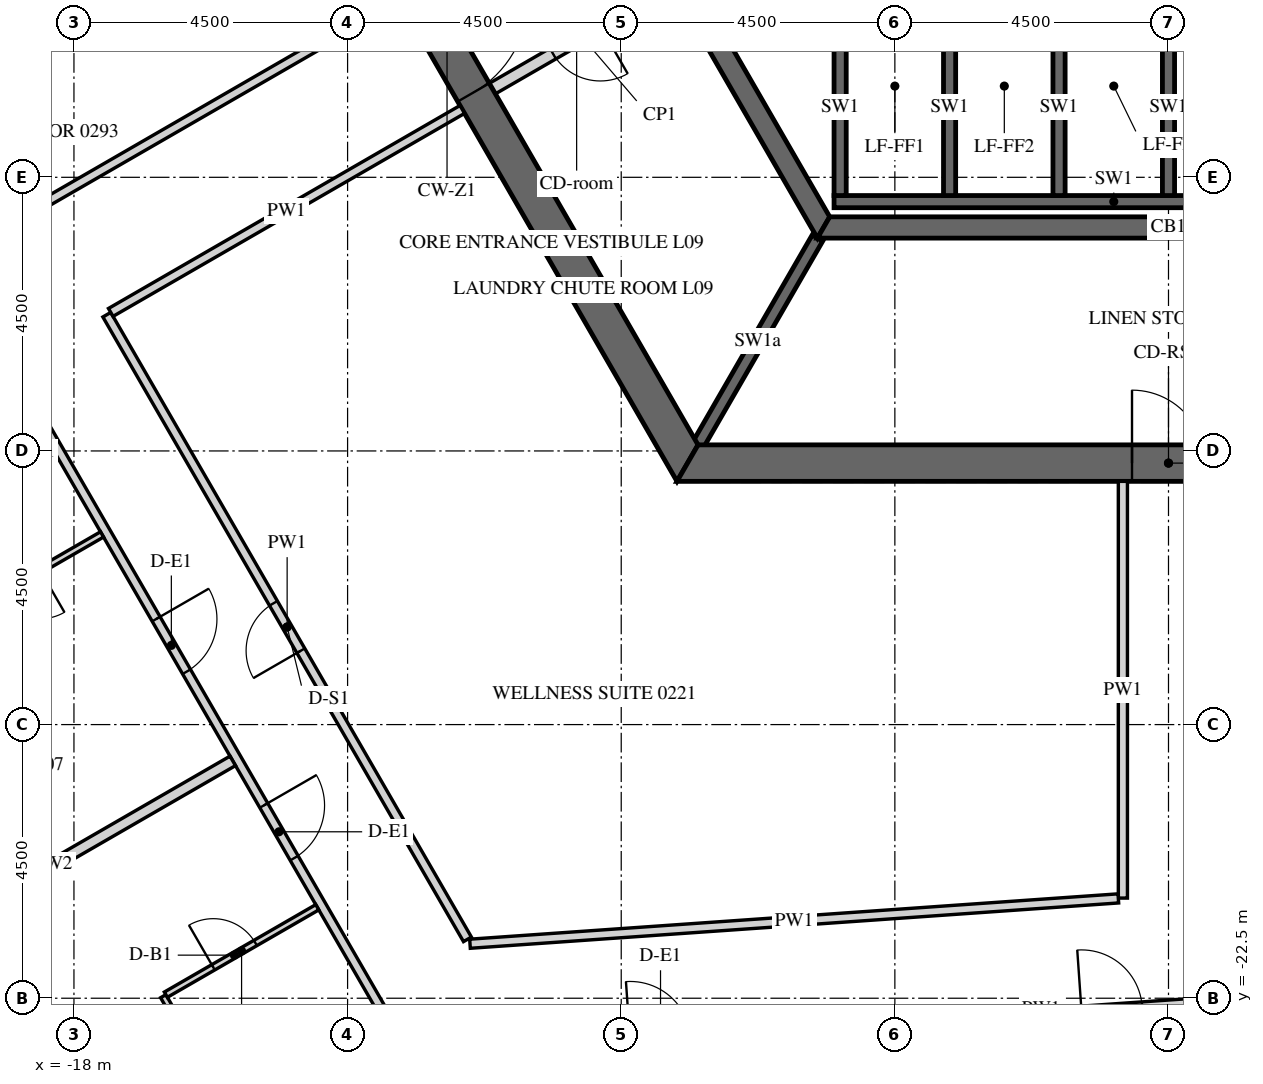
"""IFC4 building model, lengths in metres.
Left out: names, types, materials, properties, quantities, classifications, styles, units other than length and angle.
Written with IfcOpenShell. Run it as: python <this file> out.ifc"""

import sys

from ifc_helpers import new_model, si_unit, direction, frame, frame_2d, origin, place, context, subcontext, project, spatial, polyline, rectangle, outline, extrude, element, fill, save


model = new_model("IFC4")
c1 = context("Model", 3, precision=1e-05, world=origin(), true_north=direction((0.0, 1.0)))
c2 = subcontext(c1, "Body", "Model", "MODEL_VIEW")
j1 = project(units=[si_unit("LENGTHUNIT", "METRE"), si_unit("PLANEANGLEUNIT", "RADIAN")], contexts=[c1])
p1 = place(None, origin())
s1 = spatial("IfcSite", under=j1, at=p1, CompositionType="ELEMENT")
p2 = place(p1, origin())
s2 = spatial("IfcBuilding", under=s1, at=p2, CompositionType="ELEMENT")
p3 = place(p2, frame((0.0, 0.0, 49.2)))
s3 = spatial("IfcBuildingStorey", under=s2, at=p3, CompositionType="ELEMENT", Elevation=49.2)
p4 = place(p3, frame((-32.655, -2.89, -0.15), z_axis=(0.0, 0.0, 1.0), x_axis=(0.499997711317, -0.866026725152, 0.0)))
e1 = element("IfcWall", 1, at=p4, inside=s3, PredefinedType="SOLIDWALL", context=c2, shape_type="SweptSolid", body=[
    extrude(outline(polyline([(-0.022, -0.275), (30.097, -0.275), (30.045, 0.275), (0.022, 0.275), (-0.022, -0.275)])), origin(), (0.0, 0.0, 1.0), 3.9),
])
p5 = place(p4, frame((1.236, 0.0, 1.05)))
e2 = element("IfcOpeningElement", 2, at=p5, cuts=e1, PredefinedType="OPENING", context=c2, shape_type="SweptSolid", body=[
    extrude(rectangle(XDim=2.4, YDim=2.4, at=frame_2d((1.2, 1.2))), frame((0.0, 0.285, 0.0), z_axis=(0.0, -1.0, 0.0), x_axis=(1.0, 0.0, 0.0)), (0.0, 0.0, 1.0), 0.57),
])
p6 = place(p4, frame((4.835, 0.0, 1.05)))
e3 = element("IfcOpeningElement", 3, at=p6, cuts=e1, PredefinedType="OPENING", context=c2, shape_type="SweptSolid", body=[
    extrude(rectangle(XDim=2.4, YDim=2.4, at=frame_2d((1.2, 1.2))), frame((0.0, 0.285, 0.0), z_axis=(0.0, -1.0, 0.0), x_axis=(1.0, 0.0, 0.0)), (0.0, 0.0, 1.0), 0.57),
])
p7 = place(p4, frame((8.436, 0.0, 1.05)))
e4 = element("IfcOpeningElement", 4, at=p7, cuts=e1, PredefinedType="OPENING", context=c2, shape_type="SweptSolid", body=[
    extrude(rectangle(XDim=2.4, YDim=2.4, at=frame_2d((1.2, 1.2))), frame((0.0, 0.285, 0.0), z_axis=(0.0, -1.0, 0.0), x_axis=(1.0, 0.0, 0.0)), (0.0, 0.0, 1.0), 0.57),
])
p8 = place(p4, frame((12.035, 0.0, 1.05)))
e5 = element("IfcOpeningElement", 5, at=p8, cuts=e1, PredefinedType="OPENING", context=c2, shape_type="SweptSolid", body=[
    extrude(rectangle(XDim=2.4, YDim=2.4, at=frame_2d((1.2, 1.2))), frame((0.0, 0.285, 0.0), z_axis=(0.0, -1.0, 0.0), x_axis=(1.0, 0.0, 0.0)), (0.0, 0.0, 1.0), 0.57),
])
p9 = place(p4, frame((15.635, 0.0, 1.05)))
e6 = element("IfcOpeningElement", 6, at=p9, cuts=e1, PredefinedType="OPENING", context=c2, shape_type="SweptSolid", body=[
    extrude(rectangle(XDim=2.4, YDim=2.4, at=frame_2d((1.2, 1.2))), frame((0.0, 0.285, 0.0), z_axis=(0.0, -1.0, 0.0), x_axis=(1.0, 0.0, 0.0)), (0.0, 0.0, 1.0), 0.57),
])
p10 = place(p4, frame((19.236, 0.0, 1.05)))
e7 = element("IfcOpeningElement", 7, at=p10, cuts=e1, PredefinedType="OPENING", context=c2, shape_type="SweptSolid", body=[
    extrude(rectangle(XDim=2.4, YDim=2.4, at=frame_2d((1.2, 1.2))), frame((0.0, 0.285, 0.0), z_axis=(0.0, -1.0, 0.0), x_axis=(1.0, 0.0, 0.0)), (0.0, 0.0, 1.0), 0.57),
])
p11 = place(p4, frame((22.835, 0.0, 1.05)))
e8 = element("IfcOpeningElement", 8, at=p11, cuts=e1, PredefinedType="OPENING", context=c2, shape_type="SweptSolid", body=[
    extrude(rectangle(XDim=2.4, YDim=2.4, at=frame_2d((1.2, 1.2))), frame((0.0, 0.285, 0.0), z_axis=(0.0, -1.0, 0.0), x_axis=(1.0, 0.0, 0.0)), (0.0, 0.0, 1.0), 0.57),
])
p12 = place(p4, frame((26.436, 0.0, 1.05)))
e9 = element("IfcOpeningElement", 9, at=p12, cuts=e1, PredefinedType="OPENING", context=c2, shape_type="SweptSolid", body=[
    extrude(rectangle(XDim=2.4, YDim=2.4, at=frame_2d((1.2, 1.2))), frame((0.0, 0.285, 0.0), z_axis=(0.0, -1.0, 0.0), x_axis=(1.0, 0.0, 0.0)), (0.0, 0.0, 1.0), 0.57),
])
p13 = place(p3, frame((-15.819, 0.0, -0.15), z_axis=(0.0, 0.0, 1.0), x_axis=(0.499999880136, -0.866025472988, 0.0)))
e10 = element("IfcWall", 10, at=p13, inside=s3, PredefinedType="SHEAR", context=c2, shape_type="SweptSolid", body=[
    extrude(outline(polyline([(-0.173, -0.3), (15.993, -0.3), (15.646, 0.3), (0.173, 0.3), (-0.173, -0.3)])), origin(), (0.0, 0.0, 1.0), 3.9),
])
p14 = place(p13, frame((6.981, 0.0, 0.15)))
e11 = element("IfcOpeningElement", 11, at=p14, cuts=e10, PredefinedType="OPENING", context=c2, shape_type="SweptSolid", body=[
    extrude(rectangle(XDim=1.8, YDim=2.4, at=frame_2d((0.9, 1.2))), frame((0.0, 0.31, 0.0), z_axis=(0.0, -1.0, 0.0), x_axis=(1.0, 0.0, 0.0)), (0.0, 0.0, 1.0), 0.62),
])
p15 = place(p3, frame((-7.91, -13.7, -0.15), z_axis=(0.0, 0.0, 1.0), x_axis=(1.0, 0.0, 0.0)))
e12 = element("IfcWall", 12, at=p15, inside=s3, PredefinedType="SHEAR", context=c2, shape_type="SweptSolid", body=[
    extrude(outline(polyline([(-0.173, -0.3), (15.993, -0.3), (15.646, 0.3), (0.173, 0.3), (-0.173, -0.3)])), origin(), (0.0, 0.0, 1.0), 3.9),
])
p16 = place(p15, frame((7.31, 0.0, 0.15)))
e13 = element("IfcOpeningElement", 13, at=p16, cuts=e12, PredefinedType="OPENING", context=c2, shape_type="SweptSolid", body=[
    extrude(rectangle(XDim=1.2, YDim=2.4, at=frame_2d((0.6, 1.2))), frame((0.0, 0.31, 0.0), z_axis=(0.0, -1.0, 0.0), x_axis=(1.0, 0.0, 0.0)), (0.0, 0.0, 1.0), 0.62),
])
p17 = place(p3, frame((-11.345, 0.0, -0.15), z_axis=(0.0, 0.0, 1.0), x_axis=(0.499995046907, -0.866028263435, 0.0)))
e14 = element("IfcWall", 14, at=p17, inside=s3, PredefinedType="SHEAR", context=c2, shape_type="SweptSolid", body=[
    extrude(outline(polyline([(-0.101, -0.175), (11.446, -0.175), (11.244, 0.175), (0.101, 0.175), (-0.101, -0.175)])), origin(), (0.0, 0.0, 1.0), 3.9),
])
p18 = place(p17, frame((4.744, 0.0, 0.15)))
e15 = element("IfcOpeningElement", 15, at=p18, cuts=e14, PredefinedType="OPENING", context=c2, shape_type="SweptSolid", body=[
    extrude(rectangle(XDim=1.8, YDim=2.4, at=frame_2d((0.9, 1.2))), frame((0.0, 0.185, 0.0), z_axis=(0.0, -1.0, 0.0), x_axis=(1.0, 0.0, 0.0)), (0.0, 0.0, 1.0), 0.37),
])
p19 = place(p3, frame((-5.673, -9.825, -0.15), z_axis=(0.0, 0.0, 1.0), x_axis=(1.0, 0.0, 0.0)))
e16 = element("IfcWall", 16, at=p19, inside=s3, PredefinedType="SHEAR", context=c2, shape_type="SweptSolid", body=[
    extrude(outline(polyline([(-0.101, -0.175), (11.446, -0.175), (11.244, 0.175), (0.101, 0.175), (-0.101, -0.175)])), origin(), (0.0, 0.0, 1.0), 3.9),
])
p20 = place(p3, frame((-5.5, -9.4, -0.25), z_axis=(0.0, 0.0, 1.0), x_axis=(1.0, 0.0, 0.0)))
e17 = element("IfcWall", 17, at=p20, inside=s3, PredefinedType="SHEAR", context=c2, shape_type="SweptSolid", body=[
    extrude(rectangle(XDim=9.2, YDim=0.2, at=frame_2d((4.6, 0.0))), origin(), (0.0, 0.0, 1.0), 3.9),
])
for number, where, z_axis, x_axis in (
    (18, (-5.4, -9.3, -0.25), (0.0, 0.0, 1.0), (0.0, 1.0, 0.0)),
    (19, (-3.6, -9.3, -0.25), (0.0, 0.0, 1.0), (0.0, 1.0, 0.0)),
    (20, (-1.8, -9.3, -0.25), (0.0, 0.0, 1.0), (0.0, 1.0, 0.0)),
    (21, (0.0, -9.3, -0.25), (0.0, 0.0, 1.0), (0.0, 1.0, 0.0)),
):
    element("IfcWall", number, at=place(p3, frame(where, z_axis=z_axis, x_axis=x_axis)), inside=s3, PredefinedType="SHEAR", context=c2, shape_type="SweptSolid", body=[
        extrude(rectangle(XDim=2.9, YDim=0.2, at=frame_2d((1.45, 0.0))), origin(), (0.0, 0.0, 1.0), 3.9),
    ])
p21 = place(p3, frame((-5.773, -10.0, -0.15), z_axis=(0.0, 0.0, 1.0), x_axis=(-0.500038251005, -0.86600331843, 0.0)))
e22 = element("IfcWall", 22, at=p21, inside=s3, PredefinedType="SHEAR", context=c2, shape_type="SweptSolid", body=[
    extrude(rectangle(XDim=3.926, YDim=0.2, at=frame_2d((1.963, 0.0))), origin(), (0.0, 0.0, 1.0), 3.9),
])
p22 = place(p3, frame((-8.175, -5.841, 0.0), z_axis=(0.0, 0.0, 1.0), x_axis=(-0.866020560687, -0.500008388397, 0.0)))
e23 = element("IfcWall", 23, at=p22, inside=s3, PredefinedType="PARTITIONING", context=c2, shape_type="SweptSolid", body=[
    extrude(rectangle(XDim=3.4, YDim=0.2, at=frame_2d((1.7, 0.0))), origin(), (0.0, 0.0, 1.0), 3.65),
])
p23 = place(p22, frame((1.35, 0.0, 0.0)))
e24 = element("IfcOpeningElement", 24, at=p23, cuts=e23, PredefinedType="OPENING", context=c2, shape_type="SweptSolid", body=[
    extrude(rectangle(XDim=0.9, YDim=2.1, at=frame_2d((0.45, 1.05))), frame((0.0, 0.11, 0.0), z_axis=(0.0, -1.0, 0.0), x_axis=(1.0, 0.0, 0.0)), (0.0, 0.0, 1.0), 0.22),
])
p24 = place(p3, frame((-24.783, -2.175, 0.0), z_axis=(0.0, 0.0, 1.0), x_axis=(0.500001098408, -0.866024769617, 0.0)))
e25 = element("IfcWall", 25, at=p24, inside=s3, PredefinedType="PARTITIONING", context=c2, shape_type="SweptSolid", body=[
    extrude(rectangle(XDim=24.599, YDim=0.15, at=frame_2d((12.299, 0.0))), origin(), (0.0, 0.0, 1.0), 2.988),
])
p25 = place(p24, frame((2.816, 0.0, 0.0)))
e26 = element("IfcOpeningElement", 26, at=p25, cuts=e25, PredefinedType="OPENING", context=c2, shape_type="SweptSolid", body=[
    extrude(rectangle(XDim=1.0, YDim=2.1, at=frame_2d((0.5, 1.05))), frame((0.0, 0.085, 0.0), z_axis=(0.0, -1.0, 0.0), x_axis=(1.0, 0.0, 0.0)), (0.0, 0.0, 1.0), 0.17),
])
p26 = place(p24, frame((8.919, 0.0, 0.0)))
e27 = element("IfcOpeningElement", 27, at=p26, cuts=e25, PredefinedType="OPENING", context=c2, shape_type="SweptSolid", body=[
    extrude(rectangle(XDim=1.0, YDim=2.1, at=frame_2d((0.5, 1.05))), frame((0.0, 0.085, 0.0), z_axis=(0.0, -1.0, 0.0), x_axis=(1.0, 0.0, 0.0)), (0.0, 0.0, 1.0), 0.17),
])
p27 = place(p24, frame((16.269, 0.0, 0.0)))
e28 = element("IfcOpeningElement", 28, at=p27, cuts=e25, PredefinedType="OPENING", context=c2, shape_type="SweptSolid", body=[
    extrude(rectangle(XDim=1.0, YDim=2.1, at=frame_2d((0.5, 1.05))), frame((0.0, 0.085, 0.0), z_axis=(0.0, -1.0, 0.0), x_axis=(1.0, 0.0, 0.0)), (0.0, 0.0, 1.0), 0.17),
])
p28 = place(p24, frame((19.809, 0.0, 0.0)))
e29 = element("IfcOpeningElement", 29, at=p28, cuts=e25, PredefinedType="OPENING", context=c2, shape_type="SweptSolid", body=[
    extrude(rectangle(XDim=1.0, YDim=2.1, at=frame_2d((0.5, 1.05))), frame((0.0, 0.085, 0.0), z_axis=(0.0, -1.0, 0.0), x_axis=(1.0, 0.0, 0.0)), (0.0, 0.0, 1.0), 0.17),
])
p29 = place(p3, frame((-12.4, -23.472, 0.0), z_axis=(0.0, 0.0, 1.0), x_axis=(0.997564133303, 0.069755286163, 0.0)))
e30 = element("IfcWall", 30, at=p29, inside=s3, PredefinedType="PARTITIONING", context=c2, shape_type="SweptSolid", body=[
    extrude(rectangle(XDim=22.669, YDim=0.15, at=frame_2d((11.334, 0.0))), origin(), (0.0, 0.0, 1.0), 2.988),
])
p30 = place(p29, frame((3.556, 0.0, 0.0)))
e31 = element("IfcOpeningElement", 31, at=p30, cuts=e30, PredefinedType="OPENING", context=c2, shape_type="SweptSolid", body=[
    extrude(rectangle(XDim=1.0, YDim=2.1, at=frame_2d((0.5, 1.05))), frame((0.0, 0.085, 0.0), z_axis=(0.0, -1.0, 0.0), x_axis=(1.0, 0.0, 0.0)), (0.0, 0.0, 1.0), 0.17),
])
p31 = place(p29, frame((10.996, 0.0, 0.0)))
e32 = element("IfcOpeningElement", 32, at=p31, cuts=e30, PredefinedType="OPENING", context=c2, shape_type="SweptSolid", body=[
    extrude(rectangle(XDim=1.0, YDim=2.1, at=frame_2d((0.5, 1.05))), frame((0.0, 0.085, 0.0), z_axis=(0.0, -1.0, 0.0), x_axis=(1.0, 0.0, 0.0)), (0.0, 0.0, 1.0), 0.17),
])
p32 = place(p3, frame((-12.664, -6.066, 0.0), z_axis=(0.0, 0.0, 1.0), x_axis=(-0.866026575979, -0.499997969693, 0.0)))
e33 = element("IfcWall", 33, at=p32, inside=s3, PredefinedType="PARTITIONING", context=c2, shape_type="SweptSolid", body=[
    extrude(rectangle(XDim=6.75, YDim=0.15, at=frame_2d((3.375, 0.0))), origin(), (0.0, 0.0, 1.0), 2.988),
])
p33 = place(p3, frame((-0.75, -14.0, 0.0), z_axis=(0.0, 0.0, 1.0), x_axis=(0.0, -1.0, 0.0)))
e34 = element("IfcWall", 34, at=p33, inside=s3, PredefinedType="PARTITIONING", context=c2, shape_type="SweptSolid", body=[
    extrude(rectangle(XDim=6.853, YDim=0.15, at=frame_2d((3.427, 0.0))), origin(), (0.0, 0.0, 1.0), 2.988),
])
p34 = place(p3, frame((-0.825, -20.858, 0.0), z_axis=(0.0, 0.0, 1.0), x_axis=(-0.997563801863, -0.069760025895, 0.0)))
e35 = element("IfcWall", 35, at=p34, inside=s3, PredefinedType="PARTITIONING", context=c2, shape_type="SweptSolid", body=[
    extrude(rectangle(XDim=10.688, YDim=0.15, at=frame_2d((5.344, 0.0))), origin(), (0.0, 0.0, 1.0), 2.988),
])
p35 = place(p3, frame((-11.529, -21.532, 0.0), z_axis=(0.0, 0.0, 1.0), x_axis=(-0.499990893337, 0.866030661455, 0.0)))
e36 = element("IfcWall", 36, at=p35, inside=s3, PredefinedType="PARTITIONING", context=c2, shape_type="SweptSolid", body=[
    extrude(rectangle(XDim=11.862, YDim=0.15, at=frame_2d((5.931, 0.0))), origin(), (0.0, 0.0, 1.0), 2.988),
])
p36 = place(p35, frame((5.481, 0.0, 0.0)))
e37 = element("IfcOpeningElement", 37, at=p36, cuts=e36, PredefinedType="OPENING", context=c2, shape_type="SweptSolid", body=[
    extrude(rectangle(XDim=0.9, YDim=2.1, at=frame_2d((0.45, 1.05))), frame((0.0, 0.085, 0.0), z_axis=(0.0, -1.0, 0.0), x_axis=(1.0, 0.0, 0.0)), (0.0, 0.0, 1.0), 0.17),
])
p37 = place(p3, frame((-17.395, -11.222, 0.0), z_axis=(0.0, 0.0, 1.0), x_axis=(0.86601747984, 0.500013724423, 0.0)))
e38 = element("IfcWall", 38, at=p37, inside=s3, PredefinedType="PARTITIONING", context=c2, shape_type="SweptSolid", body=[
    extrude(rectangle(XDim=6.675, YDim=0.15, at=frame_2d((3.337, 0.0))), origin(), (0.0, 0.0, 1.0), 2.988),
])
p38 = place(p3, frame((-17.538, -14.873, 0.0), z_axis=(0.0, 0.0, 1.0), x_axis=(-0.866046596414, -0.499963291492, 0.0)))
e39 = element("IfcWall", 39, at=p38, inside=s3, PredefinedType="PARTITIONING", context=c2, shape_type="SweptSolid", body=[
    extrude(rectangle(XDim=2.925, YDim=0.1, at=frame_2d((1.462, 0.0))), origin(), (0.0, 0.0, 1.0), 2.988),
])
p39 = place(p38, frame((1.175, 0.0, 0.0)))
e40 = element("IfcOpeningElement", 40, at=p39, cuts=e39, PredefinedType="OPENING", context=c2, shape_type="SweptSolid", body=[
    extrude(rectangle(XDim=0.8, YDim=2.1, at=frame_2d((0.4, 1.05))), frame((0.0, 0.06, 0.0), z_axis=(0.0, -1.0, 0.0), x_axis=(1.0, 0.0, 0.0)), (0.0, 0.0, 1.0), 0.12),
])
p40 = place(p3, frame((-21.299, -22.009, 0.0), z_axis=(0.0, 0.0, 1.0), x_axis=(0.866019982719, 0.500009389444, 0.0)))
e41 = element("IfcWall", 41, at=p40, inside=s3, PredefinedType="PARTITIONING", context=c2, shape_type="SweptSolid", body=[
    extrude(rectangle(XDim=6.825, YDim=0.18, at=frame_2d((3.413, 0.0))), origin(), (0.0, 0.0, 1.0), 2.988),
])
p41 = place(p3, frame((-15.106, -24.935, 0.0), z_axis=(0.0, 0.0, 1.0), x_axis=(-0.500036373335, 0.866004402611, 0.0)))
e42 = element("IfcWall", 42, at=p41, inside=s3, PredefinedType="PARTITIONING", context=c2, shape_type="SweptSolid", body=[
    extrude(rectangle(XDim=2.85, YDim=0.1, at=frame_2d((1.425, 0.0))), origin(), (0.0, 0.0, 1.0), 2.988),
])
p42 = place(p3, frame((-16.488, -22.441, 0.0), z_axis=(0.0, 0.0, 1.0), x_axis=(0.866018712932, 0.500011588718, 0.0)))
e43 = element("IfcWall", 43, at=p42, inside=s3, PredefinedType="PARTITIONING", context=c2, shape_type="SweptSolid", body=[
    extrude(rectangle(XDim=2.875, YDim=0.1, at=frame_2d((1.438, 0.0))), origin(), (0.0, 0.0, 1.0), 2.988),
])
p43 = place(p42, frame((0.9, 0.0, 0.0)))
e44 = element("IfcOpeningElement", 44, at=p43, cuts=e43, PredefinedType="OPENING", context=c2, shape_type="SweptSolid", body=[
    extrude(rectangle(XDim=0.8, YDim=2.1, at=frame_2d((0.4, 1.05))), frame((0.0, 0.06, 0.0), z_axis=(0.0, -1.0, 0.0), x_axis=(1.0, 0.0, 0.0)), (0.0, 0.0, 1.0), 0.12),
])
p44 = place(p14, origin())
e45 = element("IfcDoor", 45, at=p44, inside=s3, OperationType="DOUBLE_DOOR_SINGLE_SWING", PredefinedType="DOOR", context=c2, shape_type="SweptSolid", body=[
    extrude(rectangle(XDim=1.8, YDim=2.4, at=frame_2d((0.9, 1.2))), frame((0.0, 0.025, 0.0), z_axis=(0.0, -1.0, 0.0), x_axis=(1.0, 0.0, 0.0)), (0.0, 0.0, 1.0), 0.05),
])
fill(e11, e45)
p45 = place(p16, origin())
e46 = element("IfcDoor", 46, at=p45, inside=s3, OperationType="SINGLE_SWING_LEFT", PredefinedType="DOOR", context=c2, shape_type="SweptSolid", body=[
    extrude(rectangle(XDim=1.2, YDim=2.4, at=frame_2d((0.6, 1.2))), frame((0.0, 0.025, 0.0), z_axis=(0.0, -1.0, 0.0), x_axis=(1.0, 0.0, 0.0)), (0.0, 0.0, 1.0), 0.05),
])
fill(e13, e46)
p46 = place(p23, origin())
e47 = element("IfcDoor", 47, at=p46, inside=s3, OperationType="SINGLE_SWING_LEFT", PredefinedType="DOOR", context=c2, shape_type="SweptSolid", body=[
    extrude(rectangle(XDim=0.9, YDim=2.1, at=frame_2d((0.45, 1.05))), frame((0.0, 0.025, 0.0), z_axis=(0.0, -1.0, 0.0), x_axis=(1.0, 0.0, 0.0)), (0.0, 0.0, 1.0), 0.05),
])
fill(e24, e47)
p47 = place(p27, origin())
e48 = element("IfcDoor", 48, at=p47, inside=s3, OperationType="SINGLE_SWING_LEFT", PredefinedType="DOOR", context=c2, shape_type="SweptSolid", body=[
    extrude(rectangle(XDim=1.0, YDim=2.1, at=frame_2d((0.5, 1.05))), frame((0.0, 0.025, 0.0), z_axis=(0.0, -1.0, 0.0), x_axis=(1.0, 0.0, 0.0)), (0.0, 0.0, 1.0), 0.05),
])
fill(e28, e48)
p48 = place(p28, origin())
e49 = element("IfcDoor", 49, at=p48, inside=s3, OperationType="SINGLE_SWING_RIGHT", PredefinedType="DOOR", context=c2, shape_type="SweptSolid", body=[
    extrude(rectangle(XDim=1.0, YDim=2.1, at=frame_2d((0.5, 1.05))), frame((0.0, 0.025, 0.0), z_axis=(0.0, -1.0, 0.0), x_axis=(1.0, 0.0, 0.0)), (0.0, 0.0, 1.0), 0.05),
])
fill(e29, e49)
p49 = place(p43, origin())
e50 = element("IfcDoor", 50, at=p49, inside=s3, OperationType="SINGLE_SWING_RIGHT", PredefinedType="DOOR", context=c2, shape_type="SweptSolid", body=[
    extrude(rectangle(XDim=0.8, YDim=2.1, at=frame_2d((0.4, 1.05))), frame((0.0, 0.025, 0.0), z_axis=(0.0, -1.0, 0.0), x_axis=(1.0, 0.0, 0.0)), (0.0, 0.0, 1.0), 0.05),
])
fill(e44, e50)
p50 = place(p36, origin())
e51 = element("IfcDoor", 51, at=p50, inside=s3, OperationType="SINGLE_SWING_RIGHT", PredefinedType="DOOR", context=c2, shape_type="SweptSolid", body=[
    extrude(rectangle(XDim=0.9, YDim=2.1, at=frame_2d((0.45, 1.05))), frame((0.0, 0.025, 0.0), z_axis=(0.0, -1.0, 0.0), x_axis=(1.0, 0.0, 0.0)), (0.0, 0.0, 1.0), 0.05),
])
fill(e37, e51)
save(model, sys.argv[1])
